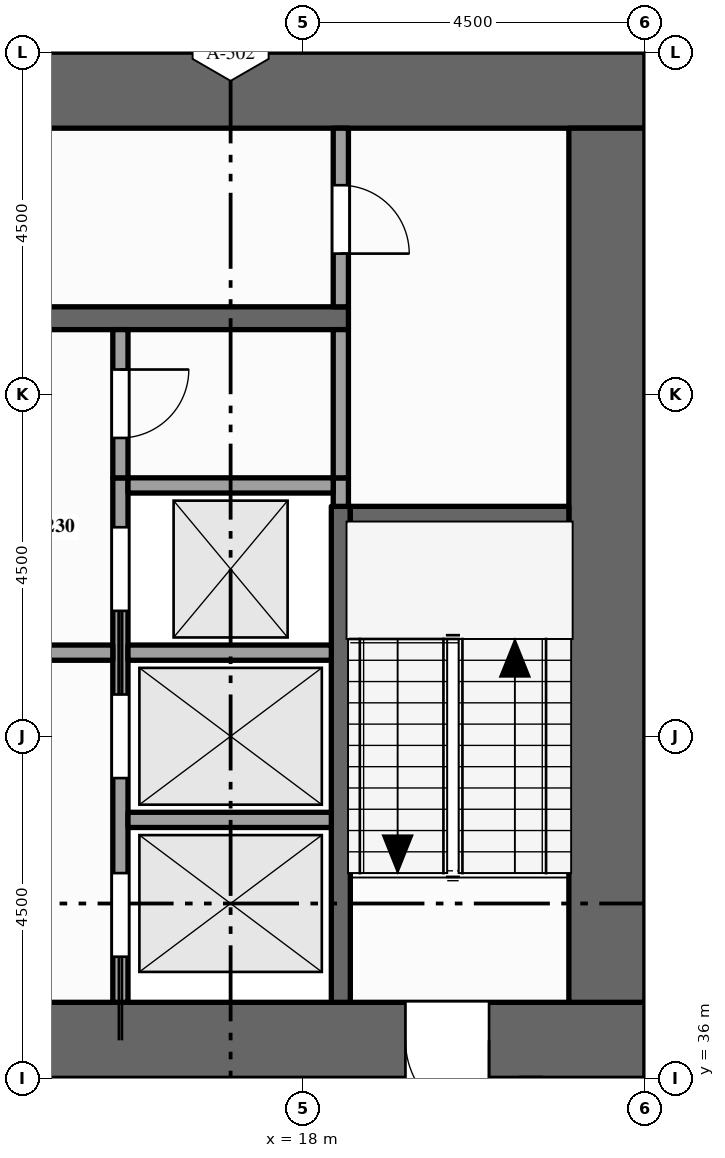
"""IFC4 building model, lengths in metres.
Left out: names, types, materials, properties, quantities, classifications, styles, units other than length and angle.
Written with IfcOpenShell. Run it as: python <this file> out.ifc"""

import sys

from ifc_helpers import new_model, si_unit, direction, frame, frame_2d, origin, place, context, subcontext, project, spatial, rectangle, extrude, element, fill, save


model = new_model("IFC4")
c1 = context("Model", 3, precision=1e-05, world=origin(), true_north=direction((0.0, 1.0)))
c2 = subcontext(c1, "Body", "Model", "MODEL_VIEW")
j1 = project(units=[si_unit("LENGTHUNIT", "METRE"), si_unit("PLANEANGLEUNIT", "RADIAN")], contexts=[c1])
p1 = place(None, origin())
s1 = spatial("IfcSite", under=j1, at=p1, CompositionType="ELEMENT")
p2 = place(p1, origin())
s2 = spatial("IfcBuilding", under=s1, at=p2, CompositionType="ELEMENT")
p3 = place(p2, frame((0.0, 0.0, 159.0)))
s3 = spatial("IfcBuildingStorey", under=s2, at=p3, CompositionType="ELEMENT", Elevation=159.0)
p4 = place(p3, frame((0.0, 36.5, -0.15), z_axis=(0.0, 0.0, 1.0), x_axis=(1.0, 0.0, 0.0)))
e1 = element("IfcWall", 1, at=p4, inside=s3, PredefinedType="SHEAR", context=c2, shape_type="SweptSolid", body=[
    extrude(rectangle(XDim=22.5, YDim=1.0, at=frame_2d((11.25, 0.0))), origin(), (0.0, 0.0, 1.0), 4.0),
])
p5 = place(p4, frame((7.1, 0.0, 0.15)))
e2 = element("IfcOpeningElement", 2, at=p5, cuts=e1, PredefinedType="OPENING", context=c2, shape_type="SweptSolid", body=[
    extrude(rectangle(XDim=1.8, YDim=2.1, at=frame_2d((0.9, 1.05))), frame((0.0, 0.51, 0.0), z_axis=(0.0, -1.0, 0.0), x_axis=(1.0, 0.0, 0.0)), (0.0, 0.0, 1.0), 1.02),
])
p6 = place(p4, frame((13.15, 0.0, 0.15)))
e3 = element("IfcOpeningElement", 3, at=p6, cuts=e1, PredefinedType="OPENING", context=c2, shape_type="SweptSolid", body=[
    extrude(rectangle(XDim=1.1, YDim=2.1, at=frame_2d((0.55, 1.05))), frame((0.0, 0.51, 0.0), z_axis=(0.0, -1.0, 0.0), x_axis=(1.0, 0.0, 0.0)), (0.0, 0.0, 1.0), 1.02),
])
p7 = place(p4, frame((2.15, 0.0, 0.15)))
e4 = element("IfcOpeningElement", 4, at=p7, cuts=e1, PredefinedType="OPENING", context=c2, shape_type="SweptSolid", body=[
    extrude(rectangle(XDim=1.1, YDim=2.1, at=frame_2d((0.55, 1.05))), frame((0.0, 0.51, 0.0), z_axis=(0.0, -1.0, 0.0), x_axis=(1.0, 0.0, 0.0)), (0.0, 0.0, 1.0), 1.02),
])
p8 = place(p4, frame((19.35, 0.0, 0.15)))
e5 = element("IfcOpeningElement", 5, at=p8, cuts=e1, PredefinedType="OPENING", context=c2, shape_type="SweptSolid", body=[
    extrude(rectangle(XDim=1.1, YDim=2.1, at=frame_2d((0.55, 1.05))), frame((0.0, 0.51, 0.0), z_axis=(0.0, -1.0, 0.0), x_axis=(1.0, 0.0, 0.0)), (0.0, 0.0, 1.0), 1.02),
])
p9 = place(p3, frame((0.0, 49.0, -0.15), z_axis=(0.0, 0.0, 1.0), x_axis=(1.0, 0.0, 0.0)))
e6 = element("IfcWall", 6, at=p9, inside=s3, PredefinedType="SHEAR", context=c2, shape_type="SweptSolid", body=[
    extrude(rectangle(XDim=22.5, YDim=1.0, at=frame_2d((11.25, 0.0))), origin(), (0.0, 0.0, 1.0), 4.0),
])
p10 = place(p3, frame((22.0, 37.0, -0.15), z_axis=(0.0, 0.0, 1.0), x_axis=(0.0, 1.0, 0.0)))
e7 = element("IfcWall", 7, at=p10, inside=s3, PredefinedType="SHEAR", context=c2, shape_type="SweptSolid", body=[
    extrude(rectangle(XDim=11.5, YDim=1.0, at=frame_2d((5.75, 0.0))), origin(), (0.0, 0.0, 1.0), 4.0),
])
p11 = place(p3, frame((15.6, 37.0, 0.0), z_axis=(0.0, 0.0, 1.0), x_axis=(0.0, 1.0, 0.0)))
e8 = element("IfcWall", 8, at=p11, inside=s3, PredefinedType="SOLIDWALL", context=c2, shape_type="SweptSolid", body=[
    extrude(rectangle(XDim=6.9, YDim=0.2, at=frame_2d((3.45, 0.0))), origin(), (0.0, 0.0, 1.0), 3.85),
])
p12 = place(p11, frame((0.6, 0.0, 0.012)))
e9 = element("IfcOpeningElement", 9, at=p12, cuts=e8, PredefinedType="OPENING", context=c2, shape_type="SweptSolid", body=[
    extrude(rectangle(XDim=1.1, YDim=2.1, at=frame_2d((0.55, 1.05))), frame((0.0, 0.11, 0.0), z_axis=(0.0, -1.0, 0.0), x_axis=(1.0, 0.0, 0.0)), (0.0, 0.0, 1.0), 0.22),
])
p13 = place(p11, frame((2.95, 0.0, 0.012)))
e10 = element("IfcOpeningElement", 10, at=p13, cuts=e8, PredefinedType="OPENING", context=c2, shape_type="SweptSolid", body=[
    extrude(rectangle(XDim=1.1, YDim=2.1, at=frame_2d((0.55, 1.05))), frame((0.0, 0.11, 0.0), z_axis=(0.0, -1.0, 0.0), x_axis=(1.0, 0.0, 0.0)), (0.0, 0.0, 1.0), 0.22),
])
p14 = place(p11, frame((5.15, 0.0, 0.012)))
e11 = element("IfcOpeningElement", 11, at=p14, cuts=e8, PredefinedType="OPENING", context=c2, shape_type="SweptSolid", body=[
    extrude(rectangle(XDim=1.1, YDim=2.1, at=frame_2d((0.55, 1.05))), frame((0.0, 0.11, 0.0), z_axis=(0.0, -1.0, 0.0), x_axis=(1.0, 0.0, 0.0)), (0.0, 0.0, 1.0), 0.22),
])
p15 = place(p3, frame((15.6, 43.9, 0.0), z_axis=(0.0, 0.0, 1.0), x_axis=(0.0, 1.0, 0.0)))
e12 = element("IfcWall", 12, at=p15, inside=s3, PredefinedType="PARTITIONING", context=c2, shape_type="SweptSolid", body=[
    extrude(rectangle(XDim=1.95, YDim=0.2, at=frame_2d((0.975, 0.0))), origin(), (0.0, 0.0, 1.0), 3.85),
])
p16 = place(p15, frame((0.525, 0.0, 0.0)))
e13 = element("IfcOpeningElement", 13, at=p16, cuts=e12, PredefinedType="OPENING", context=c2, shape_type="SweptSolid", body=[
    extrude(rectangle(XDim=0.9, YDim=2.1, at=frame_2d((0.45, 1.05))), frame((0.0, 0.11, 0.0), z_axis=(0.0, -1.0, 0.0), x_axis=(1.0, 0.0, 0.0)), (0.0, 0.0, 1.0), 0.22),
])
p17 = place(p3, frame((18.5, 37.0, 0.0), z_axis=(0.0, 0.0, 1.0), x_axis=(0.0, 1.0, 0.0)))
e14 = element("IfcWall", 14, at=p17, inside=s3, PredefinedType="SHEAR", context=c2, shape_type="SweptSolid", body=[
    extrude(rectangle(XDim=6.525, YDim=0.25, at=frame_2d((3.262, 0.0))), origin(), (0.0, 0.0, 1.0), 3.85),
])
p18 = place(p3, frame((18.5, 43.525, 0.0), z_axis=(0.0, 0.0, 1.0), x_axis=(0.0, 1.0, 0.0)))
e15 = element("IfcWall", 15, at=p18, inside=s3, PredefinedType="SOLIDWALL", context=c2, shape_type="SweptSolid", body=[
    extrude(rectangle(XDim=0.375, YDim=0.2, at=frame_2d((0.188, 0.0))), origin(), (0.0, 0.0, 1.0), 3.85),
])
p19 = place(p3, frame((18.5, 43.9, 0.0), z_axis=(0.0, 0.0, 1.0), x_axis=(0.0, 1.0, 0.0)))
e16 = element("IfcWall", 16, at=p19, inside=s3, PredefinedType="PARTITIONING", context=c2, shape_type="SweptSolid", body=[
    extrude(rectangle(XDim=1.95, YDim=0.2, at=frame_2d((0.975, 0.0))), origin(), (0.0, 0.0, 1.0), 3.85),
])
p20 = place(p3, frame((18.5, 46.15, 0.0), z_axis=(0.0, 0.0, 1.0), x_axis=(0.0, 1.0, 0.0)))
e17 = element("IfcWall", 17, at=p20, inside=s3, PredefinedType="PARTITIONING", context=c2, shape_type="SweptSolid", body=[
    extrude(rectangle(XDim=2.35, YDim=0.2, at=frame_2d((1.175, 0.0))), origin(), (0.0, 0.0, 1.0), 3.85),
])
p21 = place(p20, frame((0.7, 0.0, 0.0)))
e18 = element("IfcOpeningElement", 18, at=p21, cuts=e17, PredefinedType="OPENING", context=c2, shape_type="SweptSolid", body=[
    extrude(rectangle(XDim=0.9, YDim=2.1, at=frame_2d((0.45, 1.05))), frame((0.0, 0.11, 0.0), z_axis=(0.0, -1.0, 0.0), x_axis=(1.0, 0.0, 0.0)), (0.0, 0.0, 1.0), 0.22),
])
p22 = place(p3, frame((15.7, 39.4, 0.0), z_axis=(0.0, 0.0, 1.0), x_axis=(1.0, 0.0, 0.0)))
e19 = element("IfcWall", 19, at=p22, inside=s3, PredefinedType="SOLIDWALL", context=c2, shape_type="SweptSolid", body=[
    extrude(rectangle(XDim=2.675, YDim=0.2, at=frame_2d((1.337, 0.0))), origin(), (0.0, 0.0, 1.0), 3.85),
])
p23 = place(p3, frame((11.9, 41.6, 0.0), z_axis=(0.0, 0.0, 1.0), x_axis=(1.0, 0.0, 0.0)))
e20 = element("IfcWall", 20, at=p23, inside=s3, PredefinedType="PARTITIONING", context=c2, shape_type="SweptSolid", body=[
    extrude(rectangle(XDim=3.6, YDim=0.2, at=frame_2d((1.8, 0.0))), origin(), (0.0, 0.0, 1.0), 3.85),
])
p24 = place(p23, frame((1.3, 0.0, 0.0)))
e21 = element("IfcOpeningElement", 21, at=p24, cuts=e20, PredefinedType="OPENING", context=c2, shape_type="SweptSolid", body=[
    extrude(rectangle(XDim=1.0, YDim=2.1, at=frame_2d((0.5, 1.05))), frame((0.0, 0.11, 0.0), z_axis=(0.0, -1.0, 0.0), x_axis=(1.0, 0.0, 0.0)), (0.0, 0.0, 1.0), 0.22),
])
p25 = place(p3, frame((15.7, 41.6, 0.0), z_axis=(0.0, 0.0, 1.0), x_axis=(1.0, 0.0, 0.0)))
e22 = element("IfcWall", 22, at=p25, inside=s3, PredefinedType="SOLIDWALL", context=c2, shape_type="SweptSolid", body=[
    extrude(rectangle(XDim=2.675, YDim=0.2, at=frame_2d((1.337, 0.0))), origin(), (0.0, 0.0, 1.0), 3.85),
])
p26 = place(p3, frame((18.625, 43.4, 0.0), z_axis=(0.0, 0.0, 1.0), x_axis=(1.0, 0.0, 0.0)))
e23 = element("IfcWall", 23, at=p26, inside=s3, PredefinedType="SHEAR", context=c2, shape_type="SweptSolid", body=[
    extrude(rectangle(XDim=2.875, YDim=0.25, at=frame_2d((1.438, 0.0))), origin(), (0.0, 0.0, 1.0), 3.85),
])
p27 = place(p3, frame((15.7, 43.8, 0.0), z_axis=(0.0, 0.0, 1.0), x_axis=(1.0, 0.0, 0.0)))
e24 = element("IfcWall", 24, at=p27, inside=s3, PredefinedType="SOLIDWALL", context=c2, shape_type="SweptSolid", body=[
    extrude(rectangle(XDim=2.7, YDim=0.2, at=frame_2d((1.35, 0.0))), origin(), (0.0, 0.0, 1.0), 3.85),
])
p28 = place(p3, frame((4.1, 46.0, 0.0), z_axis=(0.0, 0.0, 1.0), x_axis=(1.0, 0.0, 0.0)))
e25 = element("IfcWall", 25, at=p28, inside=s3, PredefinedType="SHEAR", context=c2, shape_type="SweptSolid", body=[
    extrude(rectangle(XDim=14.5, YDim=0.3, at=frame_2d((7.25, 0.0))), origin(), (0.0, 0.0, 1.0), 3.85),
])
p29 = place(p28, frame((3.4, 0.0, 0.0)))
e26 = element("IfcOpeningElement", 26, at=p29, cuts=e25, PredefinedType="OPENING", context=c2, shape_type="SweptSolid", body=[
    extrude(rectangle(XDim=1.0, YDim=2.1, at=frame_2d((0.5, 1.05))), frame((0.0, 0.16, 0.0), z_axis=(0.0, -1.0, 0.0), x_axis=(1.0, 0.0, 0.0)), (0.0, 0.0, 1.0), 0.32),
])
p30 = place(p28, frame((9.1, 0.0, 0.0)))
e27 = element("IfcOpeningElement", 27, at=p30, cuts=e25, PredefinedType="OPENING", context=c2, shape_type="SweptSolid", body=[
    extrude(rectangle(XDim=1.0, YDim=2.1, at=frame_2d((0.5, 1.05))), frame((0.0, 0.16, 0.0), z_axis=(0.0, -1.0, 0.0), x_axis=(1.0, 0.0, 0.0)), (0.0, 0.0, 1.0), 0.32),
])
p31 = place(p12, origin())
e28 = element("IfcDoor", 28, at=p31, inside=s3, OperationType="SLIDING_TO_LEFT", PredefinedType="DOOR", context=c2, shape_type="SweptSolid", body=[
    extrude(rectangle(XDim=1.1, YDim=2.1, at=frame_2d((0.55, 1.05))), frame((0.0, 0.025, 0.0), z_axis=(0.0, -1.0, 0.0), x_axis=(1.0, 0.0, 0.0)), (0.0, 0.0, 1.0), 0.05),
])
fill(e9, e28)
p32 = place(p13, origin())
e29 = element("IfcDoor", 29, at=p32, inside=s3, OperationType="SLIDING_TO_RIGHT", PredefinedType="DOOR", context=c2, shape_type="SweptSolid", body=[
    extrude(rectangle(XDim=1.1, YDim=2.1, at=frame_2d((0.55, 1.05))), frame((0.0, 0.025, 0.0), z_axis=(0.0, -1.0, 0.0), x_axis=(1.0, 0.0, 0.0)), (0.0, 0.0, 1.0), 0.05),
])
fill(e10, e29)
p33 = place(p14, origin())
e30 = element("IfcDoor", 30, at=p33, inside=s3, OperationType="SLIDING_TO_LEFT", PredefinedType="DOOR", context=c2, shape_type="SweptSolid", body=[
    extrude(rectangle(XDim=1.1, YDim=2.1, at=frame_2d((0.55, 1.05))), frame((0.0, 0.025, 0.0), z_axis=(0.0, -1.0, 0.0), x_axis=(1.0, 0.0, 0.0)), (0.0, 0.0, 1.0), 0.05),
])
fill(e11, e30)
p34 = place(p8, origin())
e31 = element("IfcDoor", 31, at=p34, inside=s3, OperationType="SINGLE_SWING_RIGHT", PredefinedType="DOOR", context=c2, shape_type="SweptSolid", body=[
    extrude(rectangle(XDim=1.1, YDim=2.1, at=frame_2d((0.55, 1.05))), frame((0.0, 0.025, 0.0), z_axis=(0.0, -1.0, 0.0), x_axis=(1.0, 0.0, 0.0)), (0.0, 0.0, 1.0), 0.05),
])
fill(e5, e31)
p35 = place(p21, origin())
e32 = element("IfcDoor", 32, at=p35, inside=s3, OperationType="SINGLE_SWING_LEFT", PredefinedType="DOOR", context=c2, shape_type="SweptSolid", body=[
    extrude(rectangle(XDim=0.9, YDim=2.1, at=frame_2d((0.45, 1.05))), frame((0.0, 0.025, 0.0), z_axis=(0.0, -1.0, 0.0), x_axis=(1.0, 0.0, 0.0)), (0.0, 0.0, 1.0), 0.05),
])
fill(e18, e32)
p36 = place(p16, origin())
e33 = element("IfcDoor", 33, at=p36, inside=s3, OperationType="SINGLE_SWING_RIGHT", PredefinedType="DOOR", context=c2, shape_type="SweptSolid", body=[
    extrude(rectangle(XDim=0.9, YDim=2.1, at=frame_2d((0.45, 1.05))), frame((0.0, 0.025, 0.0), z_axis=(0.0, -1.0, 0.0), x_axis=(1.0, 0.0, 0.0)), (0.0, 0.0, 1.0), 0.05),
])
fill(e13, e33)
save(model, sys.argv[1])
